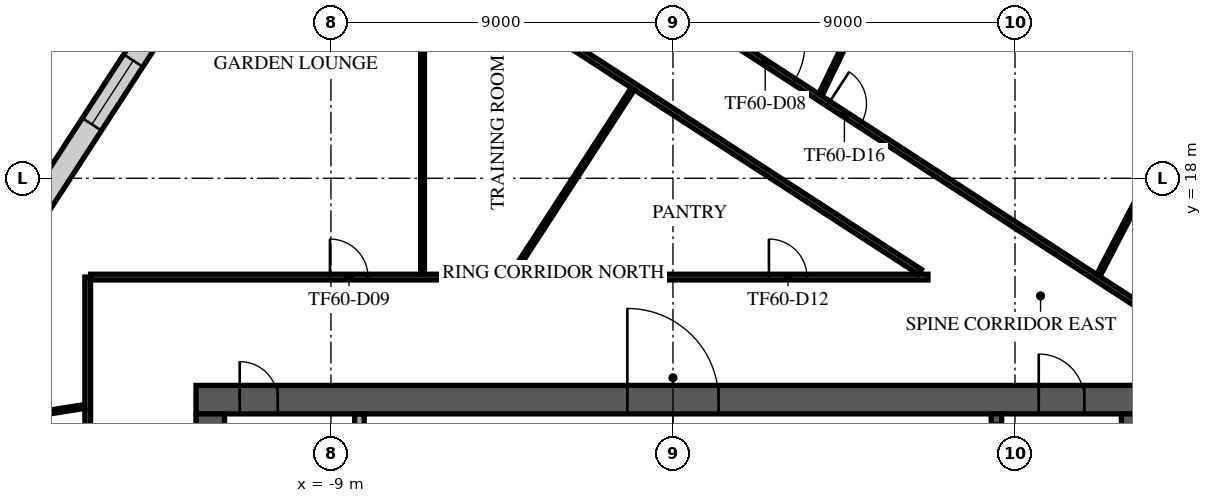
"""IFC4 building model, lengths in metres.
Left out: names, types, materials, properties, quantities, classifications, styles, units other than length and angle.
Written with IfcOpenShell. Run it as: python <this file> out.ifc"""

import sys

from ifc_helpers import new_model, si_unit, direction, frame, frame_2d, origin, place, context, subcontext, project, spatial, rectangle, extrude, element, fill, save


model = new_model("IFC4")
c1 = context("Model", 3, precision=1e-05, world=origin(), true_north=direction((0.0, 1.0)))
c2 = subcontext(c1, "Body", "Model", "MODEL_VIEW")
j1 = project(units=[si_unit("LENGTHUNIT", "METRE"), si_unit("PLANEANGLEUNIT", "RADIAN")], contexts=[c1])
p1 = place(None, origin())
s1 = spatial("IfcSite", under=j1, at=p1, CompositionType="ELEMENT")
p2 = place(p1, origin())
s2 = spatial("IfcBuilding", under=s1, at=p2, CompositionType="ELEMENT")
p3 = place(p2, frame((0.0, 0.0, 254.9)))
s3 = spatial("IfcBuildingStorey", under=s2, at=p3, CompositionType="ELEMENT", Elevation=254.9)
p4 = place(p3, frame((-12.55, 12.175, 0.0), z_axis=(0.0, 0.0, 1.0), x_axis=(1.0, 0.0, 0.0)))
e1 = element("IfcWall", 1, at=p4, inside=s3, PredefinedType="SHEAR", context=c2, shape_type="SweptSolid", body=[
    extrude(rectangle(XDim=25.1, YDim=0.75, at=frame_2d((12.55, 0.0))), origin(), (0.0, 0.0, 1.0), 3.64),
])
p5 = place(p4, frame((11.35, 0.0, 0.0)))
e2 = element("IfcOpeningElement", 2, at=p5, cuts=e1, PredefinedType="OPENING", context=c2, shape_type="SweptSolid", body=[
    extrude(rectangle(XDim=2.4, YDim=2.4, at=frame_2d((1.2, 1.2))), frame((0.0, 0.385, 0.0), z_axis=(0.0, -1.0, 0.0), x_axis=(1.0, 0.0, 0.0)), (0.0, 0.0, 1.0), 0.77),
])
p6 = place(p4, frame((22.175, 0.0, 0.0)))
e3 = element("IfcOpeningElement", 3, at=p6, cuts=e1, PredefinedType="OPENING", context=c2, shape_type="SweptSolid", body=[
    extrude(rectangle(XDim=1.2, YDim=2.1, at=frame_2d((0.6, 1.05))), frame((0.0, 0.385, 0.0), z_axis=(0.0, -1.0, 0.0), x_axis=(1.0, 0.0, 0.0)), (0.0, 0.0, 1.0), 0.77),
])
p7 = place(p4, frame((1.15, 0.0, 0.0)))
e4 = element("IfcOpeningElement", 4, at=p7, cuts=e1, PredefinedType="OPENING", context=c2, shape_type="SweptSolid", body=[
    extrude(rectangle(XDim=1.0, YDim=2.1, at=frame_2d((0.5, 1.05))), frame((0.0, 0.385, 0.0), z_axis=(0.0, -1.0, 0.0), x_axis=(1.0, 0.0, 0.0)), (0.0, 0.0, 1.0), 0.77),
])
p8 = place(p3, frame((12.175, -11.8, 0.0), z_axis=(0.0, 0.0, 1.0), x_axis=(0.0, 1.0, 0.0)))
e5 = element("IfcWall", 5, at=p8, inside=s3, PredefinedType="SHEAR", context=c2, shape_type="SweptSolid", body=[
    extrude(rectangle(XDim=23.6, YDim=0.75, at=frame_2d((11.8, 0.0))), origin(), (0.0, 0.0, 1.0), 3.64),
])
p9 = place(p8, frame((10.6, 0.0, 0.0)))
e6 = element("IfcOpeningElement", 6, at=p9, cuts=e5, PredefinedType="OPENING", context=c2, shape_type="SweptSolid", body=[
    extrude(rectangle(XDim=2.4, YDim=2.4, at=frame_2d((1.2, 1.2))), frame((0.0, 0.385, 0.0), z_axis=(0.0, -1.0, 0.0), x_axis=(1.0, 0.0, 0.0)), (0.0, 0.0, 1.0), 0.77),
])
p10 = place(p3, frame((-12.175, -11.8, 0.0), z_axis=(0.0, 0.0, 1.0), x_axis=(0.0, 1.0, 0.0)))
e7 = element("IfcWall", 7, at=p10, inside=s3, PredefinedType="SHEAR", context=c2, shape_type="SweptSolid", body=[
    extrude(rectangle(XDim=23.6, YDim=0.75, at=frame_2d((11.8, 0.0))), origin(), (0.0, 0.0, 1.0), 3.64),
])
p11 = place(p10, frame((10.6, 0.0, 0.0)))
e8 = element("IfcOpeningElement", 8, at=p11, cuts=e7, PredefinedType="OPENING", context=c2, shape_type="SweptSolid", body=[
    extrude(rectangle(XDim=2.4, YDim=2.4, at=frame_2d((1.2, 1.2))), frame((0.0, 0.385, 0.0), z_axis=(0.0, -1.0, 0.0), x_axis=(1.0, 0.0, 0.0)), (0.0, 0.0, 1.0), 0.77),
])
p12 = place(p3, frame((8.512, 4.55, 0.0), z_axis=(0.0, 0.0, 1.0), x_axis=(0.0, 1.0, 0.0)))
e9 = element("IfcWall", 9, at=p12, inside=s3, PredefinedType="SOLIDWALL", context=c2, shape_type="SweptSolid", body=[
    extrude(rectangle(XDim=7.25, YDim=0.275, at=frame_2d((3.625, 0.0))), origin(), (0.0, 0.0, 1.0), 3.64),
])
p13 = place(p12, frame((6.0, 0.0, 0.0)))
e10 = element("IfcOpeningElement", 10, at=p13, cuts=e9, PredefinedType="OPENING", context=c2, shape_type="SweptSolid", body=[
    extrude(rectangle(XDim=1.0, YDim=2.1, at=frame_2d((0.5, 1.05))), frame((0.0, 0.147, 0.0), z_axis=(0.0, -1.0, 0.0), x_axis=(1.0, 0.0, 0.0)), (0.0, 0.0, 1.0), 0.295),
])
p14 = place(p3, frame((-8.25, 8.805, 0.0), z_axis=(0.0, 0.0, 1.0), x_axis=(0.0, 1.0, 0.0)))
e11 = element("IfcWall", 11, at=p14, inside=s3, PredefinedType="PARTITIONING", context=c2, shape_type="SweptSolid", body=[
    extrude(rectangle(XDim=2.99, YDim=0.25, at=frame_2d((1.495, 0.0))), origin(), (0.0, 0.0, 1.0), 3.64),
])
p15 = place(p14, frame((0.895, 0.0, 0.0)))
e12 = element("IfcOpeningElement", 12, at=p15, cuts=e11, PredefinedType="OPENING", context=c2, shape_type="SweptSolid", body=[
    extrude(rectangle(XDim=1.0, YDim=2.1, at=frame_2d((0.5, 1.05))), frame((0.0, 0.135, 0.0), z_axis=(0.0, -1.0, 0.0), x_axis=(1.0, 0.0, 0.0)), (0.0, 0.0, 1.0), 0.27),
])
p16 = place(p3, frame((-6.281, 33.292, 0.0), z_axis=(0.0, 0.0, 1.0), x_axis=(-0.544637268583, -0.838671715077, 0.0)))
e13 = element("IfcWall", 13, at=p16, inside=s3, PredefinedType="STANDARD", context=c2, shape_type="SweptSolid", body=[
    extrude(rectangle(XDim=48.843, YDim=0.6, at=frame_2d((24.422, 0.0))), origin(), (0.0, 0.0, 1.0), 3.64),
])
p17 = place(p16, frame((1.22, 0.0, 0.9)))
e14 = element("IfcOpeningElement", 14, at=p17, cuts=e13, PredefinedType="OPENING", context=c2, shape_type="SweptSolid", body=[
    extrude(rectangle(XDim=2.0, YDim=2.1, at=frame_2d((1.0, 1.05))), frame((0.0, 0.31, 0.0), z_axis=(0.0, -1.0, 0.0), x_axis=(1.0, 0.0, 0.0)), (0.0, 0.0, 1.0), 0.62),
])
p18 = place(p16, frame((5.66, 0.0, 0.9)))
e15 = element("IfcOpeningElement", 15, at=p18, cuts=e13, PredefinedType="OPENING", context=c2, shape_type="SweptSolid", body=[
    extrude(rectangle(XDim=2.0, YDim=2.1, at=frame_2d((1.0, 1.05))), frame((0.0, 0.31, 0.0), z_axis=(0.0, -1.0, 0.0), x_axis=(1.0, 0.0, 0.0)), (0.0, 0.0, 1.0), 0.62),
])
p19 = place(p16, frame((14.541, 0.0, 0.9)))
e16 = element("IfcOpeningElement", 16, at=p19, cuts=e13, PredefinedType="OPENING", context=c2, shape_type="SweptSolid", body=[
    extrude(rectangle(XDim=2.0, YDim=2.1, at=frame_2d((1.0, 1.05))), frame((0.0, 0.31, 0.0), z_axis=(0.0, -1.0, 0.0), x_axis=(1.0, 0.0, 0.0)), (0.0, 0.0, 1.0), 0.62),
])
p20 = place(p16, frame((18.981, 0.0, 0.9)))
e17 = element("IfcOpeningElement", 17, at=p20, cuts=e13, PredefinedType="OPENING", context=c2, shape_type="SweptSolid", body=[
    extrude(rectangle(XDim=2.0, YDim=2.1, at=frame_2d((1.0, 1.05))), frame((0.0, 0.31, 0.0), z_axis=(0.0, -1.0, 0.0), x_axis=(1.0, 0.0, 0.0)), (0.0, 0.0, 1.0), 0.62),
])
p21 = place(p16, frame((23.422, 0.0, 0.9)))
e18 = element("IfcOpeningElement", 18, at=p21, cuts=e13, PredefinedType="OPENING", context=c2, shape_type="SweptSolid", body=[
    extrude(rectangle(XDim=2.0, YDim=2.1, at=frame_2d((1.0, 1.05))), frame((0.0, 0.31, 0.0), z_axis=(0.0, -1.0, 0.0), x_axis=(1.0, 0.0, 0.0)), (0.0, 0.0, 1.0), 0.62),
])
p22 = place(p16, frame((27.862, 0.0, 0.9)))
e19 = element("IfcOpeningElement", 19, at=p22, cuts=e13, PredefinedType="OPENING", context=c2, shape_type="SweptSolid", body=[
    extrude(rectangle(XDim=2.0, YDim=2.1, at=frame_2d((1.0, 1.05))), frame((0.0, 0.31, 0.0), z_axis=(0.0, -1.0, 0.0), x_axis=(1.0, 0.0, 0.0)), (0.0, 0.0, 1.0), 0.62),
])
p23 = place(p16, frame((32.302, 0.0, 0.9)))
e20 = element("IfcOpeningElement", 20, at=p23, cuts=e13, PredefinedType="OPENING", context=c2, shape_type="SweptSolid", body=[
    extrude(rectangle(XDim=2.0, YDim=2.1, at=frame_2d((1.0, 1.05))), frame((0.0, 0.31, 0.0), z_axis=(0.0, -1.0, 0.0), x_axis=(1.0, 0.0, 0.0)), (0.0, 0.0, 1.0), 0.62),
])
p24 = place(p16, frame((36.742, 0.0, 0.9)))
e21 = element("IfcOpeningElement", 21, at=p24, cuts=e13, PredefinedType="OPENING", context=c2, shape_type="SweptSolid", body=[
    extrude(rectangle(XDim=2.0, YDim=2.1, at=frame_2d((1.0, 1.05))), frame((0.0, 0.31, 0.0), z_axis=(0.0, -1.0, 0.0), x_axis=(1.0, 0.0, 0.0)), (0.0, 0.0, 1.0), 0.62),
])
p25 = place(p16, frame((41.183, 0.0, 0.9)))
e22 = element("IfcOpeningElement", 22, at=p25, cuts=e13, PredefinedType="OPENING", context=c2, shape_type="SweptSolid", body=[
    extrude(rectangle(XDim=2.0, YDim=2.1, at=frame_2d((1.0, 1.05))), frame((0.0, 0.31, 0.0), z_axis=(0.0, -1.0, 0.0), x_axis=(1.0, 0.0, 0.0)), (0.0, 0.0, 1.0), 0.62),
])
p26 = place(p16, frame((45.623, 0.0, 0.9)))
e23 = element("IfcOpeningElement", 23, at=p26, cuts=e13, PredefinedType="OPENING", context=c2, shape_type="SweptSolid", body=[
    extrude(rectangle(XDim=2.0, YDim=2.1, at=frame_2d((1.0, 1.05))), frame((0.0, 0.31, 0.0), z_axis=(0.0, -1.0, 0.0), x_axis=(1.0, 0.0, 0.0)), (0.0, 0.0, 1.0), 0.62),
])
p27 = place(p3, frame((31.308, 15.082, 0.0), z_axis=(0.0, 0.0, 1.0), x_axis=(-0.838672242303, 0.544636456721, 0.0)))
e24 = element("IfcWall", 24, at=p27, inside=s3, PredefinedType="STANDARD", context=c2, shape_type="SweptSolid", body=[
    extrude(rectangle(XDim=36.243, YDim=0.6, at=frame_2d((18.122, 0.0))), origin(), (0.0, 0.0, 1.0), 3.64),
])
p28 = place(p27, frame((1.215, 0.0, 0.9)))
e25 = element("IfcOpeningElement", 25, at=p28, cuts=e24, PredefinedType="OPENING", context=c2, shape_type="SweptSolid", body=[
    extrude(rectangle(XDim=2.1, YDim=2.1, at=frame_2d((1.05, 1.05))), frame((0.0, 0.31, 0.0), z_axis=(0.0, -1.0, 0.0), x_axis=(1.0, 0.0, 0.0)), (0.0, 0.0, 1.0), 0.62),
])
p29 = place(p27, frame((5.746, 0.0, 0.9)))
e26 = element("IfcOpeningElement", 26, at=p29, cuts=e24, PredefinedType="OPENING", context=c2, shape_type="SweptSolid", body=[
    extrude(rectangle(XDim=2.1, YDim=2.1, at=frame_2d((1.05, 1.05))), frame((0.0, 0.31, 0.0), z_axis=(0.0, -1.0, 0.0), x_axis=(1.0, 0.0, 0.0)), (0.0, 0.0, 1.0), 0.62),
])
p30 = place(p27, frame((10.276, 0.0, 0.9)))
e27 = element("IfcOpeningElement", 27, at=p30, cuts=e24, PredefinedType="OPENING", context=c2, shape_type="SweptSolid", body=[
    extrude(rectangle(XDim=2.1, YDim=2.1, at=frame_2d((1.05, 1.05))), frame((0.0, 0.31, 0.0), z_axis=(0.0, -1.0, 0.0), x_axis=(1.0, 0.0, 0.0)), (0.0, 0.0, 1.0), 0.62),
])
p31 = place(p27, frame((14.806, 0.0, 0.9)))
e28 = element("IfcOpeningElement", 28, at=p31, cuts=e24, PredefinedType="OPENING", context=c2, shape_type="SweptSolid", body=[
    extrude(rectangle(XDim=2.1, YDim=2.1, at=frame_2d((1.05, 1.05))), frame((0.0, 0.31, 0.0), z_axis=(0.0, -1.0, 0.0), x_axis=(1.0, 0.0, 0.0)), (0.0, 0.0, 1.0), 0.62),
])
p32 = place(p27, frame((19.337, 0.0, 0.9)))
e29 = element("IfcOpeningElement", 29, at=p32, cuts=e24, PredefinedType="OPENING", context=c2, shape_type="SweptSolid", body=[
    extrude(rectangle(XDim=2.1, YDim=2.1, at=frame_2d((1.05, 1.05))), frame((0.0, 0.31, 0.0), z_axis=(0.0, -1.0, 0.0), x_axis=(1.0, 0.0, 0.0)), (0.0, 0.0, 1.0), 0.62),
])
p33 = place(p27, frame((23.867, 0.0, 0.9)))
e30 = element("IfcOpeningElement", 30, at=p33, cuts=e24, PredefinedType="OPENING", context=c2, shape_type="SweptSolid", body=[
    extrude(rectangle(XDim=2.1, YDim=2.1, at=frame_2d((1.05, 1.05))), frame((0.0, 0.31, 0.0), z_axis=(0.0, -1.0, 0.0), x_axis=(1.0, 0.0, 0.0)), (0.0, 0.0, 1.0), 0.62),
])
p34 = place(p27, frame((28.398, 0.0, 0.9)))
e31 = element("IfcOpeningElement", 31, at=p34, cuts=e24, PredefinedType="OPENING", context=c2, shape_type="SweptSolid", body=[
    extrude(rectangle(XDim=2.1, YDim=2.1, at=frame_2d((1.05, 1.05))), frame((0.0, 0.31, 0.0), z_axis=(0.0, -1.0, 0.0), x_axis=(1.0, 0.0, 0.0)), (0.0, 0.0, 1.0), 0.62),
])
p35 = place(p27, frame((32.928, 0.0, 0.9)))
e32 = element("IfcOpeningElement", 32, at=p35, cuts=e24, PredefinedType="OPENING", context=c2, shape_type="SweptSolid", body=[
    extrude(rectangle(XDim=2.1, YDim=2.1, at=frame_2d((1.05, 1.05))), frame((0.0, 0.31, 0.0), z_axis=(0.0, -1.0, 0.0), x_axis=(1.0, 0.0, 0.0)), (0.0, 0.0, 1.0), 0.62),
])
p36 = place(p3, frame((-15.4, -9.619, 0.0), z_axis=(0.0, 0.0, 1.0), x_axis=(0.0, 1.0, 0.0)))
e33 = element("IfcWall", 33, at=p36, inside=s3, PredefinedType="PARTITIONING", context=c2, shape_type="SweptSolid", body=[
    extrude(rectangle(XDim=25.019, YDim=0.15, at=frame_2d((12.509, 0.0))), origin(), (0.0, 0.0, 1.0), 3.24),
])
p37 = place(p36, frame((9.532, 0.0, 0.0)))
e34 = element("IfcOpeningElement", 34, at=p37, cuts=e33, PredefinedType="OPENING", context=c2, shape_type="SweptSolid", body=[
    extrude(rectangle(XDim=1.8, YDim=2.1, at=frame_2d((0.9, 1.05))), frame((0.0, 0.085, 0.0), z_axis=(0.0, -1.0, 0.0), x_axis=(1.0, 0.0, 0.0)), (0.0, 0.0, 1.0), 0.17),
])
p38 = place(p36, frame((16.437, 0.0, 0.0)))
e35 = element("IfcOpeningElement", 35, at=p38, cuts=e33, PredefinedType="OPENING", context=c2, shape_type="SweptSolid", body=[
    extrude(rectangle(XDim=1.0, YDim=2.1, at=frame_2d((0.5, 1.05))), frame((0.0, 0.085, 0.0), z_axis=(0.0, -1.0, 0.0), x_axis=(1.0, 0.0, 0.0)), (0.0, 0.0, 1.0), 0.17),
])
p39 = place(p36, frame((3.05, 0.0, 0.0)))
e36 = element("IfcOpeningElement", 36, at=p39, cuts=e33, PredefinedType="OPENING", context=c2, shape_type="SweptSolid", body=[
    extrude(rectangle(XDim=1.0, YDim=2.1, at=frame_2d((0.5, 1.05))), frame((0.0, 0.085, 0.0), z_axis=(0.0, -1.0, 0.0), x_axis=(1.0, 0.0, 0.0)), (0.0, 0.0, 1.0), 0.17),
])
p40 = place(p3, frame((-15.325, 15.4, 0.0), z_axis=(0.0, 0.0, 1.0), x_axis=(1.0, 0.0, 0.0)))
e37 = element("IfcWall", 37, at=p40, inside=s3, PredefinedType="PARTITIONING", context=c2, shape_type="SweptSolid", body=[
    extrude(rectangle(XDim=22.035, YDim=0.15, at=frame_2d((11.018, 0.0))), origin(), (0.0, 0.0, 1.0), 3.24),
])
p41 = place(p40, frame((6.3, 0.0, 0.0)))
e38 = element("IfcOpeningElement", 38, at=p41, cuts=e37, PredefinedType="OPENING", context=c2, shape_type="SweptSolid", body=[
    extrude(rectangle(XDim=1.0, YDim=2.1, at=frame_2d((0.5, 1.05))), frame((0.0, 0.085, 0.0), z_axis=(0.0, -1.0, 0.0), x_axis=(1.0, 0.0, 0.0)), (0.0, 0.0, 1.0), 0.17),
])
p42 = place(p40, frame((17.851, 0.0, 0.0)))
e39 = element("IfcOpeningElement", 39, at=p42, cuts=e37, PredefinedType="OPENING", context=c2, shape_type="SweptSolid", body=[
    extrude(rectangle(XDim=1.0, YDim=2.1, at=frame_2d((0.5, 1.05))), frame((0.0, 0.085, 0.0), z_axis=(0.0, -1.0, 0.0), x_axis=(1.0, 0.0, 0.0)), (0.0, 0.0, 1.0), 0.17),
])
p43 = place(p3, frame((-7.434, 24.585, 0.0), z_axis=(0.0, 0.0, 1.0), x_axis=(0.838669191056, -0.544641155232, 0.0)))
e40 = element("IfcWall", 40, at=p43, inside=s3, PredefinedType="PARTITIONING", context=c2, shape_type="SweptSolid", body=[
    extrude(rectangle(XDim=16.612, YDim=0.15, at=frame_2d((8.306, 0.0))), origin(), (0.0, 0.0, 1.0), 3.04),
])
p44 = place(p43, frame((2.307, 0.0, 0.0)))
e41 = element("IfcOpeningElement", 41, at=p44, cuts=e40, PredefinedType="OPENING", context=c2, shape_type="SweptSolid", body=[
    extrude(rectangle(XDim=1.0, YDim=2.1, at=frame_2d((0.5, 1.05))), frame((0.0, 0.085, 0.0), z_axis=(0.0, -1.0, 0.0), x_axis=(1.0, 0.0, 0.0)), (0.0, 0.0, 1.0), 0.17),
])
p45 = place(p3, frame((-6.127, 26.598, 0.0), z_axis=(0.0, 0.0, 1.0), x_axis=(0.838670911559, -0.544638505897, 0.0)))
e42 = element("IfcWall", 42, at=p45, inside=s3, PredefinedType="PARTITIONING", context=c2, shape_type="SweptSolid", body=[
    extrude(rectangle(XDim=39.325, YDim=0.15, at=frame_2d((19.663, 0.0))), origin(), (0.0, 0.0, 1.0), 3.04),
])
p46 = place(p45, frame((9.3, 0.0, 0.0)))
e43 = element("IfcOpeningElement", 43, at=p46, cuts=e42, PredefinedType="OPENING", context=c2, shape_type="SweptSolid", body=[
    extrude(rectangle(XDim=1.8, YDim=2.1, at=frame_2d((0.9, 1.05))), frame((0.0, 0.085, 0.0), z_axis=(0.0, -1.0, 0.0), x_axis=(1.0, 0.0, 0.0)), (0.0, 0.0, 1.0), 0.17),
])
p47 = place(p45, frame((12.185, 0.0, 0.0)))
e44 = element("IfcOpeningElement", 44, at=p47, cuts=e42, PredefinedType="OPENING", context=c2, shape_type="SweptSolid", body=[
    extrude(rectangle(XDim=1.0, YDim=2.1, at=frame_2d((0.5, 1.05))), frame((0.0, 0.085, 0.0), z_axis=(0.0, -1.0, 0.0), x_axis=(1.0, 0.0, 0.0)), (0.0, 0.0, 1.0), 0.17),
])
p48 = place(p45, frame((23.155, 0.0, 0.0)))
e45 = element("IfcOpeningElement", 45, at=p48, cuts=e42, PredefinedType="OPENING", context=c2, shape_type="SweptSolid", body=[
    extrude(rectangle(XDim=1.0, YDim=2.1, at=frame_2d((0.5, 1.05))), frame((0.0, 0.085, 0.0), z_axis=(0.0, -1.0, 0.0), x_axis=(1.0, 0.0, 0.0)), (0.0, 0.0, 1.0), 0.17),
])
p49 = place(p45, frame((30.544, 0.0, 0.0)))
e46 = element("IfcOpeningElement", 46, at=p49, cuts=e42, PredefinedType="OPENING", context=c2, shape_type="SweptSolid", body=[
    extrude(rectangle(XDim=1.0, YDim=2.1, at=frame_2d((0.5, 1.05))), frame((0.0, 0.085, 0.0), z_axis=(0.0, -1.0, 0.0), x_axis=(1.0, 0.0, 0.0)), (0.0, 0.0, 1.0), 0.17),
])
p50 = place(p45, frame((36.099, 0.0, 0.0)))
e47 = element("IfcOpeningElement", 47, at=p50, cuts=e42, PredefinedType="OPENING", context=c2, shape_type="SweptSolid", body=[
    extrude(rectangle(XDim=1.0, YDim=2.1, at=frame_2d((0.5, 1.05))), frame((0.0, 0.085, 0.0), z_axis=(0.0, -1.0, 0.0), x_axis=(1.0, 0.0, 0.0)), (0.0, 0.0, 1.0), 0.17),
])
p51 = place(p3, frame((-20.244, 11.237, 0.0), z_axis=(0.0, 0.0, 1.0), x_axis=(0.987553505834, 0.157283416528, 0.0)))
e48 = element("IfcWall", 48, at=p51, inside=s3, PredefinedType="PARTITIONING", context=c2, shape_type="SweptSolid", body=[
    extrude(rectangle(XDim=4.821, YDim=0.1, at=frame_2d((2.411, 0.0))), origin(), (0.0, 0.0, 1.0), 3.04),
])
p52 = place(p3, frame((-6.589, 15.475, 0.0), z_axis=(0.0, 0.0, 1.0), x_axis=(0.0, 1.0, 0.0)))
e49 = element("IfcWall", 49, at=p52, inside=s3, PredefinedType="PARTITIONING", context=c2, shape_type="SweptSolid", body=[
    extrude(rectangle(XDim=8.439, YDim=0.1, at=frame_2d((4.219, 0.0))), origin(), (0.0, 0.0, 1.0), 3.64),
])
p53 = place(p3, frame((-4.208, 15.502, 0.0), z_axis=(0.0, 0.0, 1.0), x_axis=(0.54461893606, 0.838683620017, 0.0)))
e50 = element("IfcWall", 50, at=p53, inside=s3, PredefinedType="PARTITIONING", context=c2, shape_type="SweptSolid", body=[
    extrude(rectangle(XDim=5.785, YDim=0.1, at=frame_2d((2.893, 0.0))), origin(), (0.0, 0.0, 1.0), 3.24),
])
p54 = place(p3, frame((3.881, 20.197, 0.0), z_axis=(0.0, 0.0, 1.0), x_axis=(0.434320892127, 0.900758215428, 0.0)))
e51 = element("IfcWall", 51, at=p54, inside=s3, PredefinedType="PARTITIONING", context=c2, shape_type="SweptSolid", body=[
    extrude(rectangle(XDim=10.43, YDim=0.1, at=frame_2d((5.215, 0.0))), origin(), (0.0, 0.0, 1.0), 3.04),
])
p55 = place(p3, frame((11.194, 15.445, 0.0), z_axis=(0.0, 0.0, 1.0), x_axis=(0.461705411455, 0.887033321264, 0.0)))
e52 = element("IfcWall", 52, at=p55, inside=s3, PredefinedType="PARTITIONING", context=c2, shape_type="SweptSolid", body=[
    extrude(rectangle(XDim=10.396, YDim=0.1, at=frame_2d((5.198, 0.0))), origin(), (0.0, 0.0, 1.0), 3.04),
])
p56 = place(p5, origin())
e53 = element("IfcDoor", 53, at=p56, inside=s3, OperationType="SINGLE_SWING_LEFT", PredefinedType="DOOR", context=c2, shape_type="SweptSolid", body=[
    extrude(rectangle(XDim=2.4, YDim=2.4, at=frame_2d((1.2, 1.2))), frame((0.0, 0.025, 0.0), z_axis=(0.0, -1.0, 0.0), x_axis=(1.0, 0.0, 0.0)), (0.0, 0.0, 1.0), 0.05),
])
fill(e2, e53)
p57 = place(p6, origin())
e54 = element("IfcDoor", 54, at=p57, inside=s3, OperationType="SINGLE_SWING_LEFT", PredefinedType="DOOR", context=c2, shape_type="SweptSolid", body=[
    extrude(rectangle(XDim=1.2, YDim=2.1, at=frame_2d((0.6, 1.05))), frame((0.0, 0.025, 0.0), z_axis=(0.0, -1.0, 0.0), x_axis=(1.0, 0.0, 0.0)), (0.0, 0.0, 1.0), 0.05),
])
fill(e3, e54)
p58 = place(p7, origin())
e55 = element("IfcDoor", 55, at=p58, inside=s3, OperationType="SINGLE_SWING_LEFT", PredefinedType="DOOR", context=c2, shape_type="SweptSolid", body=[
    extrude(rectangle(XDim=1.0, YDim=2.1, at=frame_2d((0.5, 1.05))), frame((0.0, 0.025, 0.0), z_axis=(0.0, -1.0, 0.0), x_axis=(1.0, 0.0, 0.0)), (0.0, 0.0, 1.0), 0.05),
])
fill(e4, e55)
p59 = place(p19, origin())
e56 = element("IfcWindow", 56, at=p59, inside=s3, PartitioningType="SINGLE_PANEL", PredefinedType="WINDOW", context=c2, shape_type="SweptSolid", body=[
    extrude(rectangle(XDim=2.0, YDim=2.1, at=frame_2d((1.0, 1.05))), frame((0.0, 0.03, 0.0), z_axis=(0.0, -1.0, 0.0), x_axis=(1.0, 0.0, 0.0)), (0.0, 0.0, 1.0), 0.06),
])
fill(e16, e56)
p60 = place(p46, origin())
e57 = element("IfcDoor", 57, at=p60, inside=s3, OperationType="DOUBLE_DOOR_SINGLE_SWING", PredefinedType="DOOR", context=c2, shape_type="SweptSolid", body=[
    extrude(rectangle(XDim=1.8, YDim=2.1, at=frame_2d((0.9, 1.05))), frame((0.0, 0.025, 0.0), z_axis=(0.0, -1.0, 0.0), x_axis=(1.0, 0.0, 0.0)), (0.0, 0.0, 1.0), 0.05),
])
fill(e43, e57)
p61 = place(p41, origin())
e58 = element("IfcDoor", 58, at=p61, inside=s3, OperationType="SINGLE_SWING_LEFT", PredefinedType="DOOR", context=c2, shape_type="SweptSolid", body=[
    extrude(rectangle(XDim=1.0, YDim=2.1, at=frame_2d((0.5, 1.05))), frame((0.0, 0.025, 0.0), z_axis=(0.0, -1.0, 0.0), x_axis=(1.0, 0.0, 0.0)), (0.0, 0.0, 1.0), 0.05),
])
fill(e38, e58)
p62 = place(p42, origin())
e59 = element("IfcDoor", 59, at=p62, inside=s3, OperationType="SINGLE_SWING_LEFT", PredefinedType="DOOR", context=c2, shape_type="SweptSolid", body=[
    extrude(rectangle(XDim=1.0, YDim=2.1, at=frame_2d((0.5, 1.05))), frame((0.0, 0.025, 0.0), z_axis=(0.0, -1.0, 0.0), x_axis=(1.0, 0.0, 0.0)), (0.0, 0.0, 1.0), 0.05),
])
fill(e39, e59)
p63 = place(p47, origin())
e60 = element("IfcDoor", 60, at=p63, inside=s3, OperationType="SINGLE_SWING_RIGHT", PredefinedType="DOOR", context=c2, shape_type="SweptSolid", body=[
    extrude(rectangle(XDim=1.0, YDim=2.1, at=frame_2d((0.5, 1.05))), frame((0.0, 0.025, 0.0), z_axis=(0.0, -1.0, 0.0), x_axis=(1.0, 0.0, 0.0)), (0.0, 0.0, 1.0), 0.05),
])
fill(e44, e60)
save(model, sys.argv[1])
